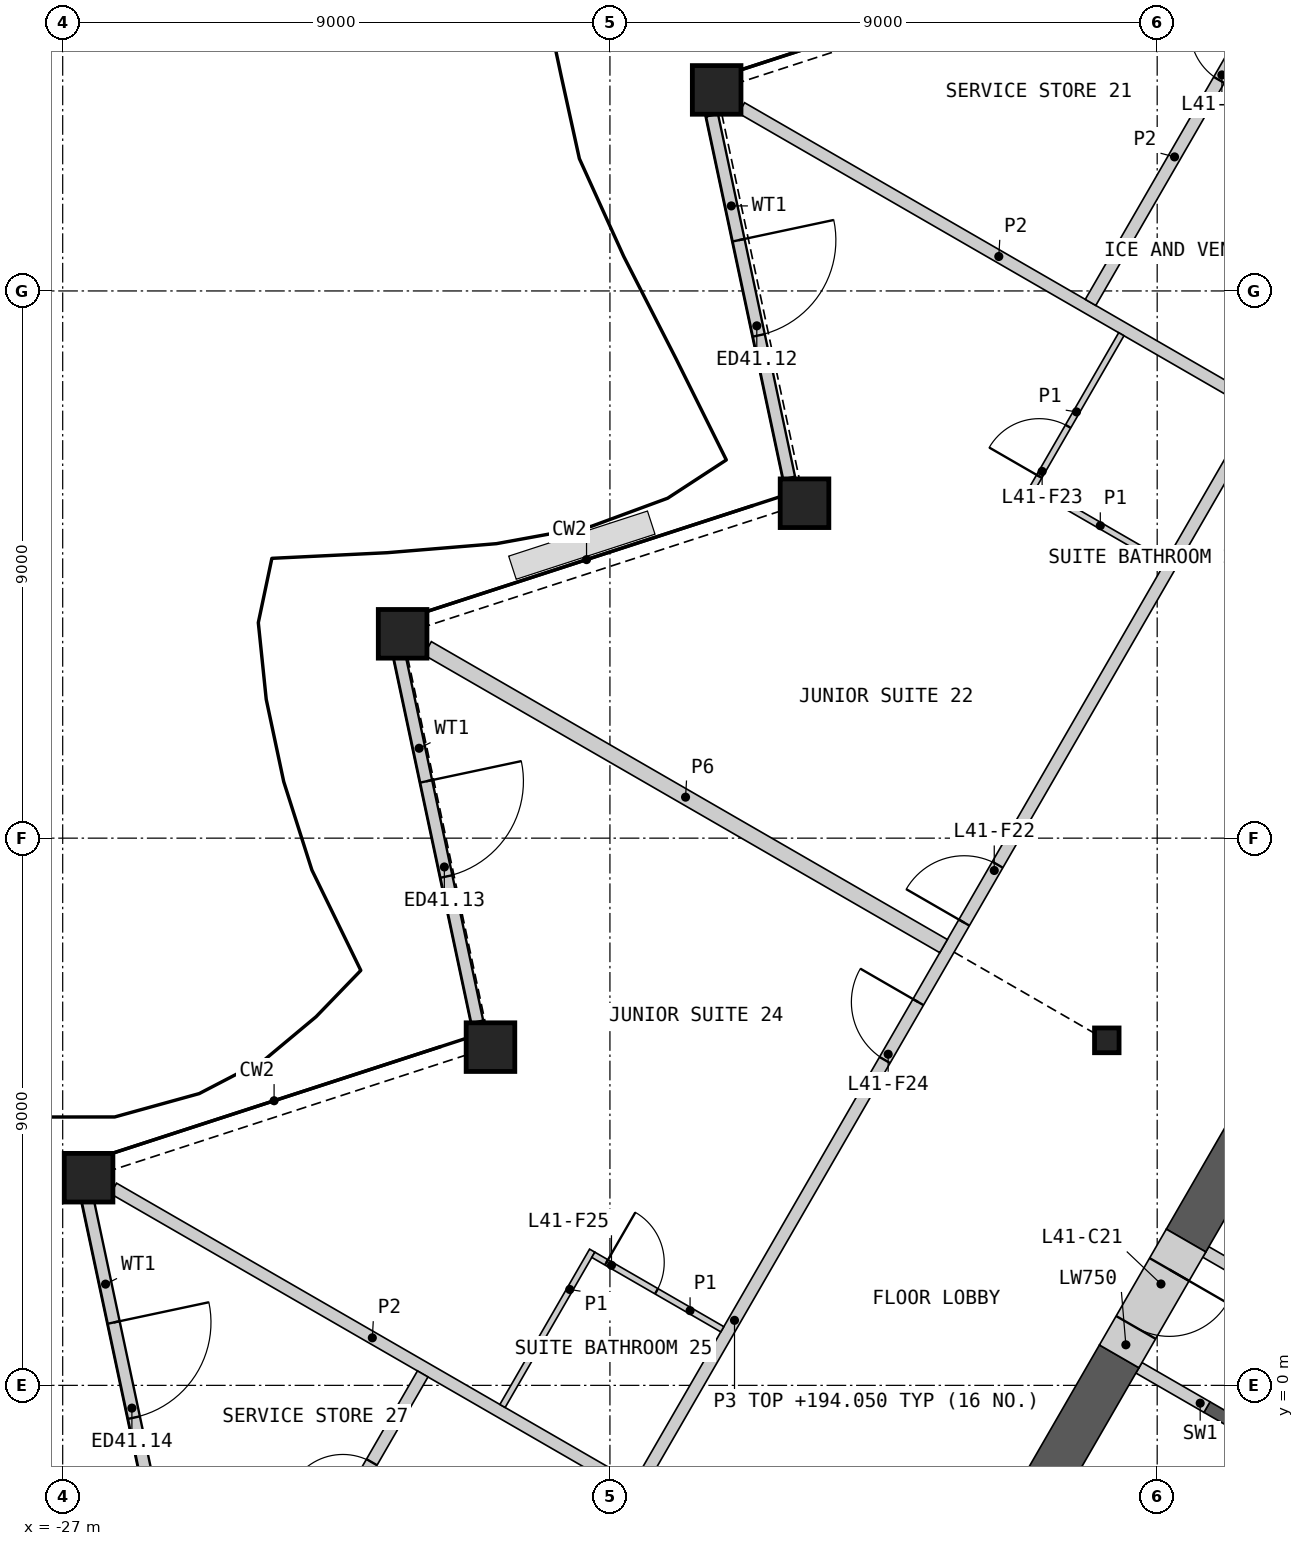
"""IFC4 building model, lengths in metres.
Left out: names, types, materials, properties, quantities, classifications, styles, units other than length and angle.
Written with IfcOpenShell. Run it as: python <this file> out.ifc"""

import sys

from ifc_helpers import new_model, si_unit, direction, frame, frame_2d, origin, origin_2d, place, context, subcontext, project, spatial, polyline, rectangle, hollow_rectangle, i_section, outline, extrude, element, fill, save


model = new_model("IFC4")
c1 = context("Model", 3, precision=1e-05, world=origin(), true_north=direction((0.0, 1.0)))
c2 = subcontext(c1, "Body", "Model", "MODEL_VIEW")
j1 = project(units=[si_unit("LENGTHUNIT", "METRE"), si_unit("PLANEANGLEUNIT", "RADIAN")], contexts=[c1])
p1 = place(None, origin())
s1 = spatial("IfcSite", under=j1, at=p1, CompositionType="ELEMENT")
p2 = place(p1, origin())
s2 = spatial("IfcBuilding", under=s1, at=p2, CompositionType="ELEMENT")
p3 = place(p2, frame((0.0, 0.0, 190.8)))
s3 = spatial("IfcBuildingStorey", under=s2, at=p3, CompositionType="ELEMENT", Elevation=190.8)
for number, where, z_axis, x_axis in (
    (1, (-16.245, 21.306, 0.0), (0.0, 0.0, 1.0), (1.0, 0.0, 0.0)),
    (2, (-14.8, 14.508, 0.0), (0.0, 0.0, 1.0), (1.0, 0.0, 0.0)),
    (3, (-21.409, 12.361, 0.0), (0.0, 0.0, 1.0), (1.0, 0.0, 0.0)),
    (4, (-19.965, 5.563, 0.0), (0.0, 0.0, 1.0), (1.0, 0.0, 0.0)),
    (5, (-26.574, 3.415, 0.0), (0.0, 0.0, 1.0), (1.0, 0.0, 0.0)),
):
    element("IfcColumn", number, at=place(p3, frame(where, z_axis=z_axis, x_axis=x_axis)), inside=s3, PredefinedType="COLUMN", context=c2, shape_type="SweptSolid", body=[
        extrude(hollow_rectangle(XDim=0.8, YDim=0.8, WallThickness=0.05, at=origin_2d()), origin(), (0.0, 0.0, 1.0), 3.6),
    ])
p4 = place(p3, frame((-9.828, 5.675, 0.0), z_axis=(0.0, 0.0, 1.0), x_axis=(1.0, 0.0, 0.0)))
e6 = element("IfcColumn", 6, at=p4, inside=s3, PredefinedType="COLUMN", context=c2, shape_type="SweptSolid", body=[
    extrude(i_section(OverallWidth=0.404, OverallDepth=0.407, WebThickness=0.027, FlangeThickness=0.044, at=origin_2d()), origin(), (0.0, 0.0, 1.0), 3.6),
])
p5 = place(p3, frame((-16.321, 20.89, 0.0), z_axis=(0.0, 0.0, 1.0), x_axis=(0.207912864597, -0.978147351238, 0.0)))
e7 = element("IfcWall", 7, at=p5, inside=s3, PredefinedType="SOLIDWALL", context=c2, shape_type="SweptSolid", body=[
    extrude(rectangle(XDim=6.098, YDim=0.2, at=frame_2d((3.049, 0.0))), origin(), (0.0, 0.0, 1.0), 2.701),
])
p6 = place(p5, frame((2.101, 0.0, 0.0)))
e8 = element("IfcOpeningElement", 8, at=p6, cuts=e7, PredefinedType="OPENING", context=c2, shape_type="SweptSolid", body=[
    extrude(rectangle(XDim=1.6, YDim=2.4, at=frame_2d((0.8, 1.2))), frame((0.0, 0.11, 0.0), z_axis=(0.0, -1.0, 0.0), x_axis=(1.0, 0.0, 0.0)), (0.0, 0.0, 1.0), 0.22),
])
p7 = place(p3, frame((-21.457, 11.978, 0.0), z_axis=(0.0, 0.0, 1.0), x_axis=(0.207930174887, -0.978143671641, 0.0)))
e9 = element("IfcWall", 9, at=p7, inside=s3, PredefinedType="SOLIDWALL", context=c2, shape_type="SweptSolid", body=[
    extrude(rectangle(XDim=6.133, YDim=0.2, at=frame_2d((3.066, 0.0))), origin(), (0.0, 0.0, 1.0), 2.701),
])
p8 = place(p7, frame((2.089, 0.0, 0.0)))
e10 = element("IfcOpeningElement", 10, at=p8, cuts=e9, PredefinedType="OPENING", context=c2, shape_type="SweptSolid", body=[
    extrude(rectangle(XDim=1.6, YDim=2.4, at=frame_2d((0.8, 1.2))), frame((0.0, 0.11, 0.0), z_axis=(0.0, -1.0, 0.0), x_axis=(1.0, 0.0, 0.0)), (0.0, 0.0, 1.0), 0.22),
])
p9 = place(p3, frame((-26.595, 3.078, 0.0), z_axis=(0.0, 0.0, 1.0), x_axis=(0.207907263894, -0.978148541695, 0.0)))
e11 = element("IfcWall", 11, at=p9, inside=s3, PredefinedType="SOLIDWALL", context=c2, shape_type="SweptSolid", body=[
    extrude(rectangle(XDim=5.779, YDim=0.2, at=frame_2d((2.889, 0.0))), origin(), (0.0, 0.0, 1.0), 2.701),
])
p10 = place(p9, frame((2.089, 0.0, 0.0)))
e12 = element("IfcOpeningElement", 12, at=p10, cuts=e11, PredefinedType="OPENING", context=c2, shape_type="SweptSolid", body=[
    extrude(rectangle(XDim=1.6, YDim=2.4, at=frame_2d((0.8, 1.2))), frame((0.0, 0.11, 0.0), z_axis=(0.0, -1.0, 0.0), x_axis=(1.0, 0.0, 0.0)), (0.0, 0.0, 1.0), 0.22),
])
p11 = place(p3, origin())
e13 = element("IfcWall", 13, at=p11, inside=s3, PredefinedType="SHEAR", context=c2, shape_type="SweptSolid", body=[
    extrude(outline(polyline([(-6.061, -1.697), (-8.231, -0.444), (-8.131, -0.271), (-5.96, -1.524), (-6.061, -1.697)])), origin(), (0.0, 0.0, 1.0), 3.25),
])
for number, where, z_axis, x_axis in (
    (14, (-7.081, 1.548, 0.0), (0.0, 0.0, 1.0), (-0.866, 0.5, 0.0)),
    (15, (-8.181, -0.357, 0.0), (0.0, 0.0, 1.0), (-0.866, 0.5, 0.0)),
):
    element("IfcWall", number, at=place(p3, frame(where, z_axis=z_axis, x_axis=x_axis)), inside=s3, PredefinedType="SHEAR", context=c2, shape_type="SweptSolid", body=[
        extrude(rectangle(XDim=1.293, YDim=0.2, at=frame_2d((0.646, 0.0))), origin(), (0.0, 0.0, 1.0), 3.25),
    ])
p12 = place(p3, origin())
e16 = element("IfcWall", 16, at=p12, inside=s3, PredefinedType="SHEAR", context=c2, shape_type="SweptSolid", body=[
    extrude(outline(polyline([(-5.307, -1.281), (-10.374, -4.206), (-10.032, -4.298), (-5.182, -1.498), (-5.307, -1.281)])), origin(), (0.0, 0.0, 1.0), 3.25),
])
p13 = place(p3, frame((-4.95, 8.574, 0.0), z_axis=(0.0, 0.0, 1.0), x_axis=(-0.499987463267, -0.866032641749, 0.0)))
e17 = element("IfcWall", 17, at=p13, inside=s3, PredefinedType="SHEAR", context=c2, shape_type="SweptSolid", body=[
    extrude(rectangle(XDim=7.151, YDim=0.75, at=frame_2d((3.575, 0.0))), origin(), (0.0, 0.0, 1.0), 3.25),
])
p14 = place(p3, frame((-9.625, 0.477, 0.0), z_axis=(0.0, 0.0, 1.0), x_axis=(-0.499951145694, -0.866053607994, 0.0)))
e18 = element("IfcWall", 18, at=p14, inside=s3, PredefinedType="SHEAR", context=c2, shape_type="SweptSolid", body=[
    extrude(rectangle(XDim=3.851, YDim=0.75, at=frame_2d((1.925, 0.0))), origin(), (0.0, 0.0, 1.0), 3.25),
])
p15 = place(p3, frame((-8.525, 2.382, 0.0), z_axis=(0.0, 0.0, 1.0), x_axis=(-0.500077893725, -0.86598042715, 0.0)))
e19 = element("IfcWall", 19, at=p15, inside=s3, PredefinedType="SHEAR", context=c2, shape_type="SweptSolid", body=[
    extrude(rectangle(XDim=2.2, YDim=0.75, at=frame_2d((1.1, 0.0))), origin(), (0.0, 0.0, 1.0), 3.25),
])
p16 = place(p15, frame((0.55, 0.0, 0.0)))
e20 = element("IfcOpeningElement", 20, at=p16, cuts=e19, PredefinedType="OPENING", context=c2, shape_type="SweptSolid", body=[
    extrude(rectangle(XDim=1.1, YDim=2.1, at=frame_2d((0.55, 1.05))), frame((0.0, 0.385, 0.0), z_axis=(0.0, -1.0, 0.0), x_axis=(1.0, 0.0, 0.0)), (0.0, 0.0, 1.0), 0.77),
])
p17 = place(p3, frame((-19.476, -5.035, 0.0), z_axis=(0.0, 0.0, 1.0), x_axis=(0.500000757641, 0.86602496636, 0.0)))
e21 = element("IfcWall", 21, at=p17, inside=s3, PredefinedType="PARTITIONING", context=c2, shape_type="SweptSolid", body=[
    extrude(rectangle(XDim=28.198, YDim=0.2, at=frame_2d((14.099, 0.0))), origin(), (0.0, 0.0, 1.0), 3.25),
])
p18 = place(p17, frame((25.796, 0.0, 0.0)))
e22 = element("IfcOpeningElement", 22, at=p18, cuts=e21, PredefinedType="OPENING", context=c2, shape_type="SweptSolid", body=[
    extrude(rectangle(XDim=0.95, YDim=2.1, at=frame_2d((0.475, 1.05))), frame((0.0, 0.11, 0.0), z_axis=(0.0, -1.0, 0.0), x_axis=(1.0, 0.0, 0.0)), (0.0, 0.0, 1.0), 0.22),
])
p19 = place(p17, frame((14.603, 0.0, 0.0)))
e23 = element("IfcOpeningElement", 23, at=p19, cuts=e21, PredefinedType="OPENING", context=c2, shape_type="SweptSolid", body=[
    extrude(rectangle(XDim=1.1, YDim=2.1, at=frame_2d((0.55, 1.05))), frame((0.0, 0.11, 0.0), z_axis=(0.0, -1.0, 0.0), x_axis=(1.0, 0.0, 0.0)), (0.0, 0.0, 1.0), 0.22),
])
p20 = place(p17, frame((11.993, 0.0, 0.0)))
e24 = element("IfcOpeningElement", 24, at=p20, cuts=e21, PredefinedType="OPENING", context=c2, shape_type="SweptSolid", body=[
    extrude(rectangle(XDim=1.1, YDim=2.1, at=frame_2d((0.55, 1.05))), frame((0.0, 0.11, 0.0), z_axis=(0.0, -1.0, 0.0), x_axis=(1.0, 0.0, 0.0)), (0.0, 0.0, 1.0), 0.22),
])
p21 = place(p17, frame((1.452, 0.0, 0.0)))
e25 = element("IfcOpeningElement", 25, at=p21, cuts=e21, PredefinedType="OPENING", context=c2, shape_type="SweptSolid", body=[
    extrude(rectangle(XDim=0.95, YDim=2.1, at=frame_2d((0.475, 1.05))), frame((0.0, 0.11, 0.0), z_axis=(0.0, -1.0, 0.0), x_axis=(1.0, 0.0, 0.0)), (0.0, 0.0, 1.0), 0.22),
])
p22 = place(p3, frame((-21.0, 12.124, 0.0), z_axis=(0.0, 0.0, 1.0), x_axis=(0.866032905446, -0.499987006516, 0.0)))
e26 = element("IfcWall", 26, at=p22, inside=s3, PredefinedType="PARTITIONING", context=c2, shape_type="SweptSolid", body=[
    extrude(rectangle(XDim=9.799, YDim=0.25, at=frame_2d((4.899, 0.0))), origin(), (0.0, 0.0, 1.0), 2.404),
])
p23 = place(p3, frame((-11.021, 29.57, 0.0), z_axis=(0.0, 0.0, 1.0), x_axis=(0.478233946204, -0.878232482147, 0.0)))
e27 = element("IfcWall", 27, at=p23, inside=s3, PredefinedType="PARTITIONING", context=c2, shape_type="SweptSolid", body=[
    extrude(rectangle(XDim=11.596, YDim=0.2, at=frame_2d((5.798, 0.0))), origin(), (0.0, 0.0, 1.0), 2.404),
])
p24 = place(p3, frame((-26.164, 3.239, 0.0), z_axis=(0.0, 0.0, 1.0), x_axis=(0.866025932773, -0.499999083763, 0.0)))
e28 = element("IfcWall", 28, at=p24, inside=s3, PredefinedType="PARTITIONING", context=c2, shape_type="SweptSolid", body=[
    extrude(rectangle(XDim=9.83, YDim=0.2, at=frame_2d((4.915, 0.0))), origin(), (0.0, 0.0, 1.0), 2.404),
])
p25 = place(p3, frame((-15.835, 21.009, 0.0), z_axis=(0.0, 0.0, 1.0), x_axis=(0.866024525919, -0.500001520505, 0.0)))
e29 = element("IfcWall", 29, at=p25, inside=s3, PredefinedType="PARTITIONING", context=c2, shape_type="SweptSolid", body=[
    extrude(rectangle(XDim=9.769, YDim=0.2, at=frame_2d((4.885, 0.0))), origin(), (0.0, 0.0, 1.0), 2.404),
])
p26 = place(p3, frame((-24.045, -4.949, 0.0), z_axis=(0.0, 0.0, 1.0), x_axis=(0.500016988964, 0.866015594979, 0.0)))
e30 = element("IfcWall", 30, at=p26, inside=s3, PredefinedType="PARTITIONING", context=c2, shape_type="SweptSolid", body=[
    extrude(rectangle(XDim=5.931, YDim=0.2, at=frame_2d((2.966, 0.0))), origin(), (0.0, 0.0, 1.0), 2.404),
])
p27 = place(p26, frame((3.305, 0.0, 0.0)))
e31 = element("IfcOpeningElement", 31, at=p27, cuts=e30, PredefinedType="OPENING", context=c2, shape_type="SweptSolid", body=[
    extrude(rectangle(XDim=0.95, YDim=2.1, at=frame_2d((0.475, 1.05))), frame((0.0, 0.11, 0.0), z_axis=(0.0, -1.0, 0.0), x_axis=(1.0, 0.0, 0.0)), (0.0, 0.0, 1.0), 0.22),
])
p28 = place(p3, frame((-10.096, 17.811, 0.0), z_axis=(0.0, 0.0, 1.0), x_axis=(0.500015590807, 0.866016402241, 0.0)))
e32 = element("IfcWall", 32, at=p28, inside=s3, PredefinedType="PARTITIONING", context=c2, shape_type="SweptSolid", body=[
    extrude(rectangle(XDim=5.527, YDim=0.2, at=frame_2d((2.764, 0.0))), origin(), (0.0, 0.0, 1.0), 2.404),
])
p29 = place(p28, frame((4.225, 0.0, 0.0)))
e33 = element("IfcOpeningElement", 33, at=p29, cuts=e32, PredefinedType="OPENING", context=c2, shape_type="SweptSolid", body=[
    extrude(rectangle(XDim=0.95, YDim=2.1, at=frame_2d((0.475, 1.05))), frame((0.0, 0.11, 0.0), z_axis=(0.0, -1.0, 0.0), x_axis=(1.0, 0.0, 0.0)), (0.0, 0.0, 1.0), 0.22),
])
p30 = place(p3, frame((-11.065, 14.733, 0.0), z_axis=(0.0, 0.0, 1.0), x_axis=(0.500037662692, 0.866003658127, 0.0)))
e34 = element("IfcWall", 34, at=p30, inside=s3, PredefinedType="PARTITIONING", context=c2, shape_type="SweptSolid", body=[
    extrude(rectangle(XDim=2.95, YDim=0.1, at=frame_2d((1.475, 0.0))), origin(), (0.0, 0.0, 1.0), 2.404),
])
p31 = place(p30, frame((0.25, 0.0, 0.0)))
e35 = element("IfcOpeningElement", 35, at=p31, cuts=e34, PredefinedType="OPENING", context=c2, shape_type="SweptSolid", body=[
    extrude(rectangle(XDim=0.95, YDim=2.1, at=frame_2d((0.475, 1.05))), frame((0.0, 0.06, 0.0), z_axis=(0.0, -1.0, 0.0), x_axis=(1.0, 0.0, 0.0)), (0.0, 0.0, 1.0), 0.12),
])
p32 = place(p3, frame((-19.767, -0.339, 0.0), z_axis=(0.0, 0.0, 1.0), x_axis=(0.499939757307, 0.866060182126, 0.0)))
e36 = element("IfcWall", 36, at=p32, inside=s3, PredefinedType="PARTITIONING", context=c2, shape_type="SweptSolid", body=[
    extrude(rectangle(XDim=2.95, YDim=0.1, at=frame_2d((1.475, 0.0))), origin(), (0.0, 0.0, 1.0), 2.404),
])
p33 = place(p3, frame((-10.996, 14.752, 0.0), z_axis=(0.0, 0.0, 1.0), x_axis=(0.866014668023, -0.500018594424, 0.0)))
e37 = element("IfcWall", 37, at=p33, inside=s3, PredefinedType="PARTITIONING", context=c2, shape_type="SweptSolid", body=[
    extrude(rectangle(XDim=2.45, YDim=0.1, at=frame_2d((1.225, 0.0))), origin(), (0.0, 0.0, 1.0), 2.404),
])
p34 = place(p3, frame((-18.273, 2.147, 0.0), z_axis=(0.0, 0.0, 1.0), x_axis=(0.866014668023, -0.500018594424, 0.0)))
e38 = element("IfcWall", 38, at=p34, inside=s3, PredefinedType="PARTITIONING", context=c2, shape_type="SweptSolid", body=[
    extrude(rectangle(XDim=2.45, YDim=0.1, at=frame_2d((1.225, 0.0))), origin(), (0.0, 0.0, 1.0), 2.404),
])
p35 = place(p34, frame((0.25, 0.0, 0.0)))
e39 = element("IfcOpeningElement", 39, at=p35, cuts=e38, PredefinedType="OPENING", context=c2, shape_type="SweptSolid", body=[
    extrude(rectangle(XDim=0.95, YDim=2.1, at=frame_2d((0.475, 1.05))), frame((0.0, 0.06, 0.0), z_axis=(0.0, -1.0, 0.0), x_axis=(1.0, 0.0, 0.0)), (0.0, 0.0, 1.0), 0.12),
])
p36 = place(p6, origin())
e40 = element("IfcDoor", 40, at=p36, inside=s3, OperationType="DOUBLE_DOOR_SINGLE_SWING", PredefinedType="DOOR", context=c2, shape_type="SweptSolid", body=[
    extrude(rectangle(XDim=1.6, YDim=2.4, at=frame_2d((0.8, 1.2))), frame((0.0, 0.025, 0.0), z_axis=(0.0, -1.0, 0.0), x_axis=(1.0, 0.0, 0.0)), (0.0, 0.0, 1.0), 0.05),
])
fill(e8, e40)
p37 = place(p8, origin())
e41 = element("IfcDoor", 41, at=p37, inside=s3, OperationType="DOUBLE_DOOR_SINGLE_SWING", PredefinedType="DOOR", context=c2, shape_type="SweptSolid", body=[
    extrude(rectangle(XDim=1.6, YDim=2.4, at=frame_2d((0.8, 1.2))), frame((0.0, 0.025, 0.0), z_axis=(0.0, -1.0, 0.0), x_axis=(1.0, 0.0, 0.0)), (0.0, 0.0, 1.0), 0.05),
])
fill(e10, e41)
p38 = place(p10, origin())
e42 = element("IfcDoor", 42, at=p38, inside=s3, OperationType="DOUBLE_DOOR_SINGLE_SWING", PredefinedType="DOOR", context=c2, shape_type="SweptSolid", body=[
    extrude(rectangle(XDim=1.6, YDim=2.4, at=frame_2d((0.8, 1.2))), frame((0.0, 0.025, 0.0), z_axis=(0.0, -1.0, 0.0), x_axis=(1.0, 0.0, 0.0)), (0.0, 0.0, 1.0), 0.05),
])
fill(e12, e42)
p39 = place(p16, origin())
e43 = element("IfcDoor", 43, at=p39, inside=s3, OperationType="SINGLE_SWING_LEFT", PredefinedType="DOOR", context=c2, shape_type="SweptSolid", body=[
    extrude(rectangle(XDim=1.1, YDim=2.1, at=frame_2d((0.55, 1.05))), frame((0.0, 0.13, 0.0), z_axis=(0.0, -1.0, 0.0), x_axis=(1.0, 0.0, 0.0)), (0.0, 0.0, 1.0), 0.05),
])
fill(e20, e43)
p40 = place(p29, origin())
e44 = element("IfcDoor", 44, at=p40, inside=s3, OperationType="SINGLE_SWING_RIGHT", PredefinedType="DOOR", context=c2, shape_type="SweptSolid", body=[
    extrude(rectangle(XDim=0.95, YDim=2.1, at=frame_2d((0.475, 1.05))), frame((0.0, 0.025, 0.0), z_axis=(0.0, -1.0, 0.0), x_axis=(1.0, 0.0, 0.0)), (0.0, 0.0, 1.0), 0.05),
])
fill(e33, e44)
p41 = place(p19, origin())
e45 = element("IfcDoor", 45, at=p41, inside=s3, OperationType="SINGLE_SWING_LEFT", PredefinedType="DOOR", context=c2, shape_type="SweptSolid", body=[
    extrude(rectangle(XDim=1.1, YDim=2.1, at=frame_2d((0.55, 1.05))), frame((0.0, 0.025, 0.0), z_axis=(0.0, -1.0, 0.0), x_axis=(1.0, 0.0, 0.0)), (0.0, 0.0, 1.0), 0.05),
])
fill(e23, e45)
p42 = place(p31, origin())
e46 = element("IfcDoor", 46, at=p42, inside=s3, OperationType="SINGLE_SWING_LEFT", PredefinedType="DOOR", context=c2, shape_type="SweptSolid", body=[
    extrude(rectangle(XDim=0.95, YDim=2.1, at=frame_2d((0.475, 1.05))), frame((0.0, 0.025, 0.0), z_axis=(0.0, -1.0, 0.0), x_axis=(1.0, 0.0, 0.0)), (0.0, 0.0, 1.0), 0.05),
])
fill(e35, e46)
p43 = place(p20, origin())
e47 = element("IfcDoor", 47, at=p43, inside=s3, OperationType="SINGLE_SWING_RIGHT", PredefinedType="DOOR", context=c2, shape_type="SweptSolid", body=[
    extrude(rectangle(XDim=1.1, YDim=2.1, at=frame_2d((0.55, 1.05))), frame((0.0, 0.025, 0.0), z_axis=(0.0, -1.0, 0.0), x_axis=(1.0, 0.0, 0.0)), (0.0, 0.0, 1.0), 0.05),
])
fill(e24, e47)
p44 = place(p35, origin())
e48 = element("IfcDoor", 48, at=p44, inside=s3, OperationType="SINGLE_SWING_LEFT", PredefinedType="DOOR", context=c2, shape_type="SweptSolid", body=[
    extrude(rectangle(XDim=0.95, YDim=2.1, at=frame_2d((0.475, 1.05))), frame((0.0, 0.025, 0.0), z_axis=(0.0, -1.0, 0.0), x_axis=(1.0, 0.0, 0.0)), (0.0, 0.0, 1.0), 0.05),
])
fill(e39, e48)
p45 = place(p27, origin())
e49 = element("IfcDoor", 49, at=p45, inside=s3, OperationType="SINGLE_SWING_LEFT", PredefinedType="DOOR", context=c2, shape_type="SweptSolid", body=[
    extrude(rectangle(XDim=0.95, YDim=2.1, at=frame_2d((0.475, 1.05))), frame((0.0, 0.025, 0.0), z_axis=(0.0, -1.0, 0.0), x_axis=(1.0, 0.0, 0.0)), (0.0, 0.0, 1.0), 0.05),
])
fill(e31, e49)
save(model, sys.argv[1])
